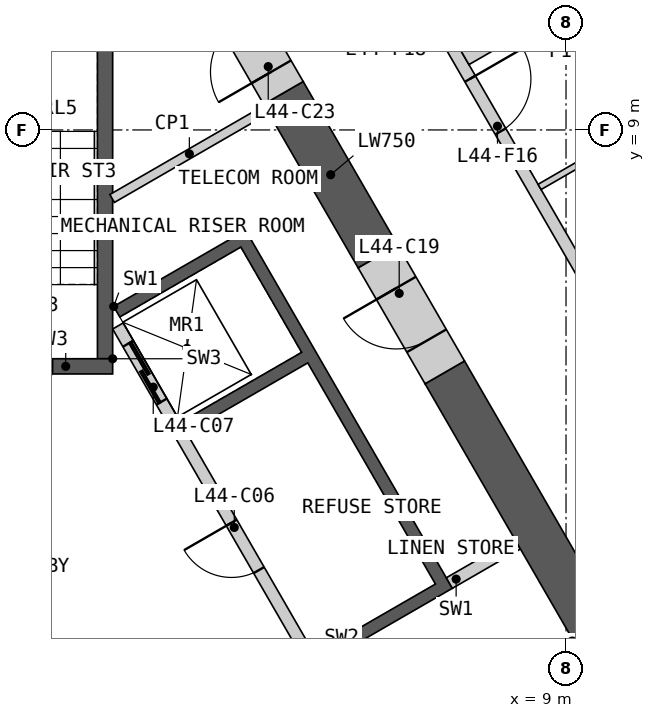
"""IFC4 building model, lengths in metres.
Left out: names, types, materials, properties, quantities, classifications, styles, units other than length and angle.
Written with IfcOpenShell. Run it as: python <this file> out.ifc"""

import sys

from ifc_helpers import new_model, si_unit, direction, frame, frame_2d, origin, place, context, subcontext, project, spatial, polyline, rectangle, outline, extrude, element, fill, save


model = new_model("IFC4")
c1 = context("Model", 3, precision=1e-05, world=origin(), true_north=direction((0.0, 1.0)))
c2 = subcontext(c1, "Body", "Model", "MODEL_VIEW")
j1 = project(units=[si_unit("LENGTHUNIT", "METRE"), si_unit("PLANEANGLEUNIT", "RADIAN")], contexts=[c1])
p1 = place(None, origin())
s1 = spatial("IfcSite", under=j1, at=p1, CompositionType="ELEMENT")
p2 = place(p1, origin())
s2 = spatial("IfcBuilding", under=s1, at=p2, CompositionType="ELEMENT")
p3 = place(p2, frame((0.0, 0.0, 201.6)))
s3 = spatial("IfcBuildingStorey", under=s2, at=p3, CompositionType="ELEMENT", Elevation=201.6)
p4 = place(p3, origin())
e1 = element("IfcWall", 1, at=p4, inside=s3, PredefinedType="SHEAR", context=c2, shape_type="SweptSolid", body=[
    extrude(outline(polyline([(1.561, 6.097), (3.731, 7.35), (7.131, 1.461), (4.96, 0.208), (4.861, 0.381), (6.852, 1.531), (4.752, 5.169), (2.76, 4.019), (2.66, 4.192), (4.652, 5.342), (3.652, 7.074), (1.66, 5.924), (1.561, 6.097)])), origin(), (0.0, 0.0, 1.0), 3.25),
])
p5 = place(p3, frame((5.817, -1.476, 0.0), z_axis=(0.0, 0.0, 1.0), x_axis=(-0.500002616675, 0.866023893041, 0.0)))
e2 = element("IfcWall", 2, at=p5, inside=s3, PredefinedType="SOLIDWALL", context=c2, shape_type="SweptSolid", body=[
    extrude(rectangle(XDim=8.373, YDim=0.2, at=frame_2d((4.187, 0.0))), origin(), (0.0, 0.0, 1.0), 3.25),
])
p6 = place(p5, frame((0.437, 0.0, 0.0)))
e3 = element("IfcOpeningElement", 3, at=p6, cuts=e2, PredefinedType="OPENING", context=c2, shape_type="SweptSolid", body=[
    extrude(rectangle(XDim=0.9, YDim=2.1, at=frame_2d((0.45, 1.05))), frame((0.0, 0.11, 0.0), z_axis=(0.0, -1.0, 0.0), x_axis=(1.0, 0.0, 0.0)), (0.0, 0.0, 1.0), 0.22),
])
p7 = place(p5, frame((3.737, 0.0, 0.0)))
e4 = element("IfcOpeningElement", 4, at=p7, cuts=e2, PredefinedType="OPENING", context=c2, shape_type="SweptSolid", body=[
    extrude(rectangle(XDim=0.9, YDim=2.1, at=frame_2d((0.45, 1.05))), frame((0.0, 0.11, 0.0), z_axis=(0.0, -1.0, 0.0), x_axis=(1.0, 0.0, 0.0)), (0.0, 0.0, 1.0), 0.22),
])
p8 = place(p5, frame((6.937, 0.0, 0.0)))
e5 = element("IfcOpeningElement", 5, at=p8, cuts=e2, PredefinedType="OPENING", context=c2, shape_type="SweptSolid", body=[
    extrude(rectangle(XDim=1.1, YDim=2.1, at=frame_2d((0.55, 1.05))), frame((0.0, 0.11, 0.0), z_axis=(0.0, -1.0, 0.0), x_axis=(1.0, 0.0, 0.0)), (0.0, 0.0, 1.0), 0.22),
])
p9 = place(p3, frame((7.081, 1.548, 0.0), z_axis=(0.0, 0.0, 1.0), x_axis=(0.866003189247, 0.500038474733, 0.0)))
e6 = element("IfcWall", 6, at=p9, inside=s3, PredefinedType="SHEAR", context=c2, shape_type="SweptSolid", body=[
    extrude(rectangle(XDim=1.293, YDim=0.2, at=frame_2d((0.646, 0.0))), origin(), (0.0, 0.0, 1.0), 3.25),
])
p10 = place(p3, origin())
e7 = element("IfcWall", 7, at=p10, inside=s3, PredefinedType="SHEAR", context=c2, shape_type="SweptSolid", body=[
    extrude(outline(polyline([(1.544, 5.237), (1.544, 11.087), (1.294, 10.837), (1.294, 5.237), (1.544, 5.237)])), origin(), (0.0, 0.0, 1.0), 3.25),
])
p11 = place(p3, frame((1.544, 5.112, 0.0), z_axis=(0.0, 0.0, 1.0), x_axis=(-1.0, 0.0, 0.0)))
e8 = element("IfcWall", 8, at=p11, inside=s3, PredefinedType="SHEAR", context=c2, shape_type="SweptSolid", body=[
    extrude(rectangle(XDim=3.088, YDim=0.25, at=frame_2d((1.544, 0.0))), origin(), (0.0, 0.0, 1.0), 3.25),
])
p12 = place(p11, frame((0.994, 0.0, 0.0)))
e9 = element("IfcOpeningElement", 9, at=p12, cuts=e8, PredefinedType="OPENING", context=c2, shape_type="SweptSolid", body=[
    extrude(rectangle(XDim=1.1, YDim=2.1, at=frame_2d((0.55, 1.05))), frame((0.0, 0.135, 0.0), z_axis=(0.0, -1.0, 0.0), x_axis=(1.0, 0.0, 0.0)), (0.0, 0.0, 1.0), 0.27),
])
p13 = place(p3, frame((4.075, 9.339, 0.0), z_axis=(0.0, 0.0, 1.0), x_axis=(-0.865995658863, -0.500051516177, 0.0)))
e10 = element("IfcWall", 10, at=p13, inside=s3, PredefinedType="PARTITIONING", context=c2, shape_type="SweptSolid", body=[
    extrude(rectangle(XDim=2.933, YDim=0.15, at=frame_2d((1.466, 0.0))), origin(), (0.0, 0.0, 1.0), 3.25),
])
p14 = place(p3, frame((14.526, -8.011, 0.0), z_axis=(0.0, 0.0, 1.0), x_axis=(-0.499996012963, 0.866027705689, 0.0)))
e11 = element("IfcWall", 11, at=p14, inside=s3, PredefinedType="SHEAR", context=c2, shape_type="SweptSolid", body=[
    extrude(rectangle(XDim=15.039, YDim=0.75, at=frame_2d((7.519, 0.0))), origin(), (0.0, 0.0, 1.0), 3.25),
])
p15 = place(p3, frame((5.906, 6.918, 0.0), z_axis=(0.0, 0.0, 1.0), x_axis=(-0.500017123375, 0.866015517374, 0.0)))
e12 = element("IfcWall", 12, at=p15, inside=s3, PredefinedType="SHEAR", context=c2, shape_type="SweptSolid", body=[
    extrude(rectangle(XDim=3.108, YDim=0.75, at=frame_2d((1.554, 0.0))), origin(), (0.0, 0.0, 1.0), 3.25),
])
p16 = place(p3, frame((7.006, 5.012, 0.0), z_axis=(0.0, 0.0, 1.0), x_axis=(-0.499946605688, 0.86605622881, 0.0)))
e13 = element("IfcWall", 13, at=p16, inside=s3, PredefinedType="SHEAR", context=c2, shape_type="SweptSolid", body=[
    extrude(rectangle(XDim=2.2, YDim=0.75, at=frame_2d((1.1, 0.0))), origin(), (0.0, 0.0, 1.0), 3.25),
])
p17 = place(p16, frame((0.6, 0.0, 0.0)))
e14 = element("IfcOpeningElement", 14, at=p17, cuts=e13, PredefinedType="OPENING", context=c2, shape_type="SweptSolid", body=[
    extrude(rectangle(XDim=1.0, YDim=2.1, at=frame_2d((0.5, 1.05))), frame((0.0, 0.385, 0.0), z_axis=(0.0, -1.0, 0.0), x_axis=(1.0, 0.0, 0.0)), (0.0, 0.0, 1.0), 0.77),
])
p18 = place(p3, frame((4.353, 9.609, 0.0), z_axis=(0.0, 0.0, 1.0), x_axis=(-0.500071537347, 0.865984097738, 0.0)))
e15 = element("IfcWall", 15, at=p18, inside=s3, PredefinedType="SHEAR", context=c2, shape_type="SweptSolid", body=[
    extrude(rectangle(XDim=1.816, YDim=0.75, at=frame_2d((0.908, 0.0))), origin(), (0.0, 0.0, 1.0), 3.25),
])
p19 = place(p18, frame((0.4, 0.0, 0.0)))
e16 = element("IfcOpeningElement", 16, at=p19, cuts=e15, PredefinedType="OPENING", context=c2, shape_type="SweptSolid", body=[
    extrude(rectangle(XDim=1.0, YDim=2.1, at=frame_2d((0.5, 1.05))), frame((0.0, 0.385, 0.0), z_axis=(0.0, -1.0, 0.0), x_axis=(1.0, 0.0, 0.0)), (0.0, 0.0, 1.0), 0.77),
])
p20 = place(p3, frame((5.038, 13.972, 0.0), z_axis=(0.0, 0.0, 1.0), x_axis=(0.50000393355, -0.866023132736, 0.0)))
e17 = element("IfcWall", 17, at=p20, inside=s3, PredefinedType="PARTITIONING", context=c2, shape_type="SweptSolid", body=[
    extrude(rectangle(XDim=9.335, YDim=0.2, at=frame_2d((4.667, 0.0))), origin(), (0.0, 0.0, 1.0), 3.25),
])
p21 = place(p20, frame((4.77, 0.0, 0.0)))
e18 = element("IfcOpeningElement", 18, at=p21, cuts=e17, PredefinedType="OPENING", context=c2, shape_type="SweptSolid", body=[
    extrude(rectangle(XDim=1.0, YDim=2.1, at=frame_2d((0.5, 1.05))), frame((0.0, 0.11, 0.0), z_axis=(0.0, -1.0, 0.0), x_axis=(1.0, 0.0, 0.0)), (0.0, 0.0, 1.0), 0.22),
])
p22 = place(p20, frame((3.163, 0.0, 0.0)))
e19 = element("IfcOpeningElement", 19, at=p22, cuts=e17, PredefinedType="OPENING", context=c2, shape_type="SweptSolid", body=[
    extrude(rectangle(XDim=1.0, YDim=2.1, at=frame_2d((0.5, 1.05))), frame((0.0, 0.11, 0.0), z_axis=(0.0, -1.0, 0.0), x_axis=(1.0, 0.0, 0.0)), (0.0, 0.0, 1.0), 0.22),
])
p23 = place(p3, frame((7.341, 10.183, 0.0), z_axis=(0.0, 0.0, 1.0), x_axis=(0.866028741424, 0.499994218994, 0.0)))
e20 = element("IfcWall", 20, at=p23, inside=s3, PredefinedType="PARTITIONING", context=c2, shape_type="SweptSolid", body=[
    extrude(rectangle(XDim=8.139, YDim=0.25, at=frame_2d((4.07, 0.0))), origin(), (0.0, 0.0, 1.0), 2.404),
])
p24 = place(p3, frame((8.565, 8.063, 0.0), z_axis=(0.0, 0.0, 1.0), x_axis=(0.866032905446, 0.499987006516, 0.0)))
e21 = element("IfcWall", 21, at=p24, inside=s3, PredefinedType="PARTITIONING", context=c2, shape_type="SweptSolid", body=[
    extrude(rectangle(XDim=2.45, YDim=0.1, at=frame_2d((1.225, 0.0))), origin(), (0.0, 0.0, 1.0), 2.404),
])
p25 = place(p7, origin())
e22 = element("IfcDoor", 22, at=p25, inside=s3, OperationType="SINGLE_SWING_RIGHT", PredefinedType="DOOR", context=c2, shape_type="SweptSolid", body=[
    extrude(rectangle(XDim=0.9, YDim=2.1, at=frame_2d((0.45, 1.05))), frame((0.0, 0.025, 0.0), z_axis=(0.0, -1.0, 0.0), x_axis=(1.0, 0.0, 0.0)), (0.0, 0.0, 1.0), 0.05),
])
fill(e4, e22)
p26 = place(p8, origin())
e23 = element("IfcDoor", 23, at=p26, inside=s3, OperationType="SLIDING_TO_LEFT", PredefinedType="DOOR", context=c2, shape_type="SweptSolid", body=[
    extrude(rectangle(XDim=1.1, YDim=2.1, at=frame_2d((0.55, 1.05))), frame((0.0, 0.025, 0.0), z_axis=(0.0, -1.0, 0.0), x_axis=(1.0, 0.0, 0.0)), (0.0, 0.0, 1.0), 0.05),
])
fill(e5, e23)
p27 = place(p12, origin())
e24 = element("IfcDoor", 24, at=p27, inside=s3, OperationType="SINGLE_SWING_RIGHT", PredefinedType="DOOR", context=c2, shape_type="SweptSolid", body=[
    extrude(rectangle(XDim=1.1, YDim=2.1, at=frame_2d((0.55, 1.05))), frame((0.0, 0.025, 0.0), z_axis=(0.0, -1.0, 0.0), x_axis=(1.0, 0.0, 0.0)), (0.0, 0.0, 1.0), 0.05),
])
fill(e9, e24)
p28 = place(p17, origin())
e25 = element("IfcDoor", 25, at=p28, inside=s3, OperationType="SINGLE_SWING_RIGHT", PredefinedType="DOOR", context=c2, shape_type="SweptSolid", body=[
    extrude(rectangle(XDim=1.0, YDim=2.1, at=frame_2d((0.5, 1.05))), frame((0.0, 0.13, 0.0), z_axis=(0.0, -1.0, 0.0), x_axis=(1.0, 0.0, 0.0)), (0.0, 0.0, 1.0), 0.05),
])
fill(e14, e25)
p29 = place(p19, origin())
e26 = element("IfcDoor", 26, at=p29, inside=s3, OperationType="SINGLE_SWING_LEFT", PredefinedType="DOOR", context=c2, shape_type="SweptSolid", body=[
    extrude(rectangle(XDim=1.0, YDim=2.1, at=frame_2d((0.5, 1.05))), frame((0.0, 0.13, 0.0), z_axis=(0.0, -1.0, 0.0), x_axis=(1.0, 0.0, 0.0)), (0.0, 0.0, 1.0), 0.05),
])
fill(e16, e26)
p30 = place(p21, origin())
e27 = element("IfcDoor", 27, at=p30, inside=s3, OperationType="SINGLE_SWING_LEFT", PredefinedType="DOOR", context=c2, shape_type="SweptSolid", body=[
    extrude(rectangle(XDim=1.0, YDim=2.1, at=frame_2d((0.5, 1.05))), frame((0.0, 0.025, 0.0), z_axis=(0.0, -1.0, 0.0), x_axis=(1.0, 0.0, 0.0)), (0.0, 0.0, 1.0), 0.05),
])
fill(e18, e27)
save(model, sys.argv[1])
